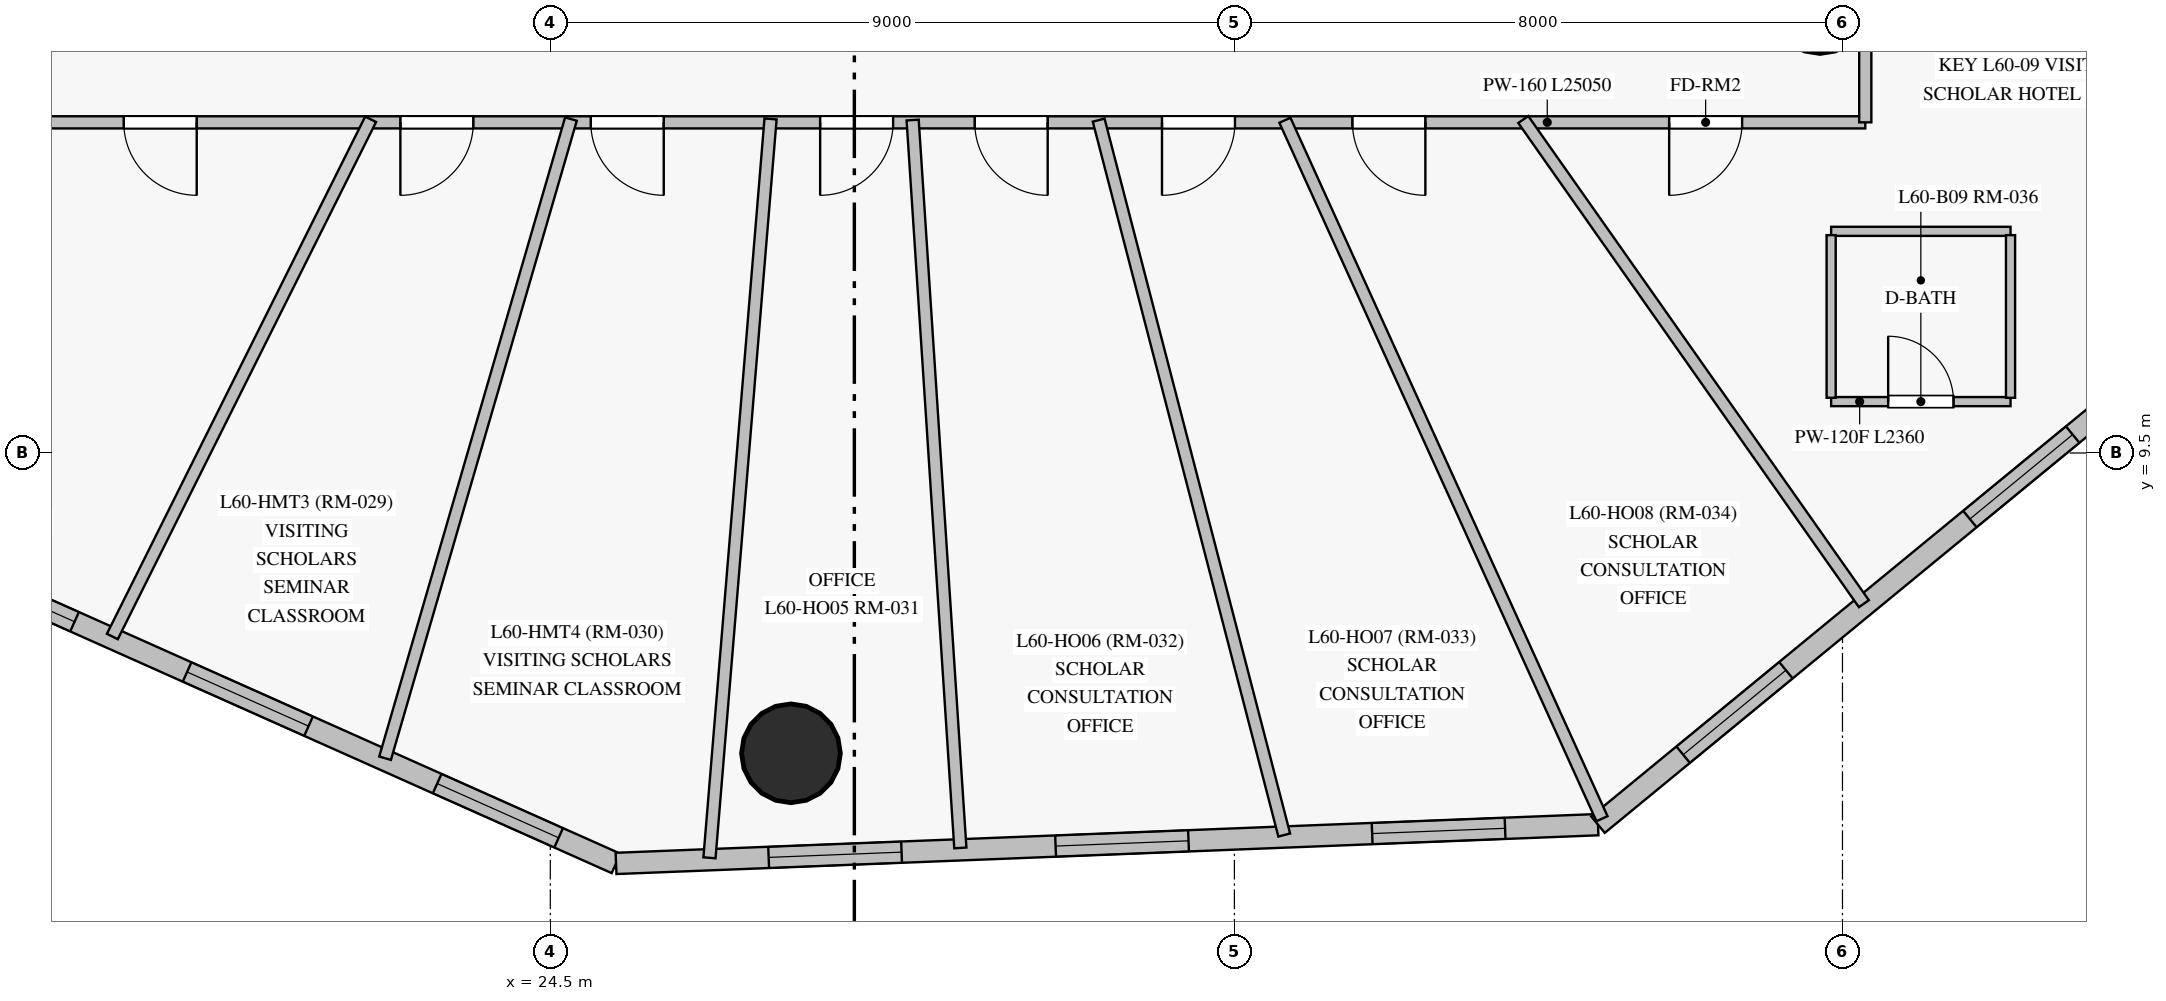
"""IFC4 building model, lengths in metres.
Left out: names, types, materials, properties, quantities, classifications, styles, units other than length and angle.
Written with IfcOpenShell. Run it as: python <this file> out.ifc"""

import sys

from ifc_helpers import new_model, si_unit, direction, frame, frame_2d, origin, origin_with_axes, origin_2d, place, context, subcontext, project, spatial, rectangle, circle, extrude, source, transform, mapped, element, fill, save


model = new_model("IFC4")
c1 = context("Model", 3, precision=1e-05, world=origin(), true_north=direction((0.0, 1.0)))
c2 = subcontext(c1, "Body", "Model", "MODEL_VIEW")
j1 = project(units=[si_unit("LENGTHUNIT", "METRE"), si_unit("PLANEANGLEUNIT", "RADIAN")], contexts=[c1])
p1 = place(None, origin())
s1 = spatial("IfcSite", under=j1, at=p1, CompositionType="ELEMENT")
p2 = place(p1, origin())
s2 = spatial("IfcBuilding", under=s1, at=p2, CompositionType="ELEMENT")
p3 = place(p2, frame((0.0, 0.0, 205.35)))
s3 = spatial("IfcBuildingStorey", under=s2, at=p3, CompositionType="ELEMENT", Elevation=205.35)
m1 = source(origin_with_axes(), c2, "Body", "SweptSolid", [
    extrude(circle(Radius=0.65, at=origin_2d()), origin(), (0.0, 0.0, 1.0), 3.05),
])
for number, where, z_axis, x_axis in (
    (1, (27.666, 5.549, 0.0), (0.0, 0.0, 1.0), (1.0, 0.0, 0.0)),
    (2, (41.204, 15.406, 0.0), (0.0, 0.0, 1.0), (1.0, 0.0, 0.0)),
):
    element("IfcColumn", number, at=place(p3, frame(where, z_axis=z_axis, x_axis=x_axis)), inside=s3, PredefinedType="COLUMN", context=c2, shape_type="MappedRepresentation", body=[
        mapped(m1, transform((0.0, 0.0, 0.0), scale=1.0)),
    ])
p4 = place(p3, frame((16.283, 8.154, 0.0), z_axis=(0.0, 0.0, 1.0), x_axis=(0.913170676177, -0.407577374459, 0.0)))
e3 = element("IfcWall", 3, at=p4, inside=s3, PredefinedType="SOLIDWALL", context=c2, shape_type="SweptSolid", body=[
    extrude(rectangle(XDim=9.946, YDim=0.28, at=frame_2d((4.973, 0.0))), origin(), (0.0, 0.0, 1.0), 2.775),
])
p5 = place(p4, frame((0.594, 0.0, 0.85)))
e4 = element("IfcOpeningElement", 4, at=p5, cuts=e3, PredefinedType="OPENING", context=c2, shape_type="SweptSolid", body=[
    extrude(rectangle(XDim=1.55, YDim=1.65, at=frame_2d((0.775, 0.825))), frame((0.0, 0.15, 0.0), z_axis=(0.0, -1.0, 0.0), x_axis=(1.0, 0.0, 0.0)), (0.0, 0.0, 1.0), 0.3),
])
p6 = place(p4, frame((3.766, 0.0, 0.85)))
e5 = element("IfcOpeningElement", 5, at=p6, cuts=e3, PredefinedType="OPENING", context=c2, shape_type="SweptSolid", body=[
    extrude(rectangle(XDim=1.75, YDim=1.65, at=frame_2d((0.875, 0.825))), frame((0.0, 0.15, 0.0), z_axis=(0.0, -1.0, 0.0), x_axis=(1.0, 0.0, 0.0)), (0.0, 0.0, 1.0), 0.3),
])
p7 = place(p4, frame((7.369, 0.0, 0.85)))
e6 = element("IfcOpeningElement", 6, at=p7, cuts=e3, PredefinedType="OPENING", context=c2, shape_type="SweptSolid", body=[
    extrude(rectangle(XDim=1.75, YDim=1.65, at=frame_2d((0.875, 0.825))), frame((0.0, 0.15, 0.0), z_axis=(0.0, -1.0, 0.0), x_axis=(1.0, 0.0, 0.0)), (0.0, 0.0, 1.0), 0.3),
])
p8 = place(p3, frame((25.365, 4.1, 0.0), z_axis=(0.0, 0.0, 1.0), x_axis=(0.999221637337, 0.039447680249, 0.0)))
e7 = element("IfcWall", 7, at=p8, inside=s3, PredefinedType="SOLIDWALL", context=c2, shape_type="SweptSolid", body=[
    extrude(rectangle(XDim=12.929, YDim=0.28, at=frame_2d((6.464, 0.0))), origin(), (0.0, 0.0, 1.0), 2.775),
])
p9 = place(p8, frame((2.009, 0.0, 0.85)))
e8 = element("IfcOpeningElement", 8, at=p9, cuts=e7, PredefinedType="OPENING", context=c2, shape_type="SweptSolid", body=[
    extrude(rectangle(XDim=1.75, YDim=1.65, at=frame_2d((0.875, 0.825))), frame((0.0, 0.15, 0.0), z_axis=(0.0, -1.0, 0.0), x_axis=(1.0, 0.0, 0.0)), (0.0, 0.0, 1.0), 0.3),
])
p10 = place(p8, frame((5.787, 0.0, 0.85)))
e9 = element("IfcOpeningElement", 9, at=p10, cuts=e7, PredefinedType="OPENING", context=c2, shape_type="SweptSolid", body=[
    extrude(rectangle(XDim=1.75, YDim=1.65, at=frame_2d((0.875, 0.825))), frame((0.0, 0.15, 0.0), z_axis=(0.0, -1.0, 0.0), x_axis=(1.0, 0.0, 0.0)), (0.0, 0.0, 1.0), 0.3),
])
p11 = place(p8, frame((9.955, 0.0, 0.85)))
e10 = element("IfcOpeningElement", 10, at=p11, cuts=e7, PredefinedType="OPENING", context=c2, shape_type="SweptSolid", body=[
    extrude(rectangle(XDim=1.75, YDim=1.65, at=frame_2d((0.875, 0.825))), frame((0.0, 0.15, 0.0), z_axis=(0.0, -1.0, 0.0), x_axis=(1.0, 0.0, 0.0)), (0.0, 0.0, 1.0), 0.3),
])
p12 = place(p3, frame((38.284, 4.61, 0.0), z_axis=(0.0, 0.0, 1.0), x_axis=(0.772578860193, 0.634918817474, 0.0)))
e11 = element("IfcWall", 11, at=p12, inside=s3, PredefinedType="SOLIDWALL", context=c2, shape_type="SweptSolid", body=[
    extrude(rectangle(XDim=9.925, YDim=0.28, at=frame_2d((4.962, 0.0))), origin(), (0.0, 0.0, 1.0), 2.775),
])
p13 = place(p12, frame((1.45, 0.0, 0.85)))
e12 = element("IfcOpeningElement", 12, at=p13, cuts=e11, PredefinedType="OPENING", context=c2, shape_type="SweptSolid", body=[
    extrude(rectangle(XDim=1.75, YDim=1.65, at=frame_2d((0.875, 0.825))), frame((0.0, 0.15, 0.0), z_axis=(0.0, -1.0, 0.0), x_axis=(1.0, 0.0, 0.0)), (0.0, 0.0, 1.0), 0.3),
])
p14 = place(p12, frame((6.333, 0.0, 0.85)))
e13 = element("IfcOpeningElement", 13, at=p14, cuts=e11, PredefinedType="OPENING", context=c2, shape_type="SweptSolid", body=[
    extrude(rectangle(XDim=1.75, YDim=1.65, at=frame_2d((0.875, 0.825))), frame((0.0, 0.15, 0.0), z_axis=(0.0, -1.0, 0.0), x_axis=(1.0, 0.0, 0.0)), (0.0, 0.0, 1.0), 0.3),
])
p15 = place(p3, frame((41.8, 13.85, 0.0), z_axis=(0.0, 0.0, 1.0), x_axis=(-1.0, 0.0, 0.0)))
e14 = element("IfcWall", 14, at=p15, inside=s3, PredefinedType="PARTITIONING", context=c2, shape_type="SweptSolid", body=[
    extrude(rectangle(XDim=25.05, YDim=0.16, at=frame_2d((12.525, 0.0))), origin(), (0.0, 0.0, 1.0), 2.225),
])
p16 = place(p15, frame((1.62, 0.0, 0.0)))
e15 = element("IfcOpeningElement", 15, at=p16, cuts=e14, PredefinedType="OPENING", context=c2, shape_type="SweptSolid", body=[
    extrude(rectangle(XDim=0.96, YDim=2.15, at=frame_2d((0.48, 1.075))), frame((0.0, 0.09, 0.0), z_axis=(0.0, -1.0, 0.0), x_axis=(1.0, 0.0, 0.0)), (0.0, 0.0, 1.0), 0.18),
])
p17 = place(p15, frame((21.952, 0.0, 0.0)))
e16 = element("IfcOpeningElement", 16, at=p17, cuts=e14, PredefinedType="OPENING", context=c2, shape_type="SweptSolid", body=[
    extrude(rectangle(XDim=0.96, YDim=2.15, at=frame_2d((0.48, 1.075))), frame((0.0, 0.09, 0.0), z_axis=(0.0, -1.0, 0.0), x_axis=(1.0, 0.0, 0.0)), (0.0, 0.0, 1.0), 0.18),
])
p18 = place(p15, frame((18.312, 0.0, 0.0)))
e17 = element("IfcOpeningElement", 17, at=p18, cuts=e14, PredefinedType="OPENING", context=c2, shape_type="SweptSolid", body=[
    extrude(rectangle(XDim=0.96, YDim=2.15, at=frame_2d((0.48, 1.075))), frame((0.0, 0.09, 0.0), z_axis=(0.0, -1.0, 0.0), x_axis=(1.0, 0.0, 0.0)), (0.0, 0.0, 1.0), 0.18),
])
p19 = place(p15, frame((15.808, 0.0, 0.0)))
e18 = element("IfcOpeningElement", 18, at=p19, cuts=e14, PredefinedType="OPENING", context=c2, shape_type="SweptSolid", body=[
    extrude(rectangle(XDim=0.96, YDim=2.15, at=frame_2d((0.48, 1.075))), frame((0.0, 0.09, 0.0), z_axis=(0.0, -1.0, 0.0), x_axis=(1.0, 0.0, 0.0)), (0.0, 0.0, 1.0), 0.18),
])
p20 = place(p15, frame((12.79, 0.0, 0.0)))
e19 = element("IfcOpeningElement", 19, at=p20, cuts=e14, PredefinedType="OPENING", context=c2, shape_type="SweptSolid", body=[
    extrude(rectangle(XDim=0.96, YDim=2.15, at=frame_2d((0.48, 1.075))), frame((0.0, 0.09, 0.0), z_axis=(0.0, -1.0, 0.0), x_axis=(1.0, 0.0, 0.0)), (0.0, 0.0, 1.0), 0.18),
])
p21 = place(p15, frame((10.756, 0.0, 0.0)))
e20 = element("IfcOpeningElement", 20, at=p21, cuts=e14, PredefinedType="OPENING", context=c2, shape_type="SweptSolid", body=[
    extrude(rectangle(XDim=0.96, YDim=2.15, at=frame_2d((0.48, 1.075))), frame((0.0, 0.09, 0.0), z_axis=(0.0, -1.0, 0.0), x_axis=(1.0, 0.0, 0.0)), (0.0, 0.0, 1.0), 0.18),
])
p22 = place(p15, frame((8.292, 0.0, 0.0)))
e21 = element("IfcOpeningElement", 21, at=p22, cuts=e14, PredefinedType="OPENING", context=c2, shape_type="SweptSolid", body=[
    extrude(rectangle(XDim=0.96, YDim=2.15, at=frame_2d((0.48, 1.075))), frame((0.0, 0.09, 0.0), z_axis=(0.0, -1.0, 0.0), x_axis=(1.0, 0.0, 0.0)), (0.0, 0.0, 1.0), 0.18),
])
p23 = place(p15, frame((5.788, 0.0, 0.0)))
e22 = element("IfcOpeningElement", 22, at=p23, cuts=e14, PredefinedType="OPENING", context=c2, shape_type="SweptSolid", body=[
    extrude(rectangle(XDim=0.96, YDim=2.15, at=frame_2d((0.48, 1.075))), frame((0.0, 0.09, 0.0), z_axis=(0.0, -1.0, 0.0), x_axis=(1.0, 0.0, 0.0)), (0.0, 0.0, 1.0), 0.18),
])
p24 = place(p3, frame((41.8, 33.45, 0.0), z_axis=(0.0, 0.0, 1.0), x_axis=(0.0, -1.0, 0.0)))
e23 = element("IfcWall", 23, at=p24, inside=s3, PredefinedType="PARTITIONING", context=c2, shape_type="SweptSolid", body=[
    extrude(rectangle(XDim=19.6, YDim=0.16, at=frame_2d((9.8, 0.0))), origin(), (0.0, 0.0, 1.0), 2.225),
])
p25 = place(p24, frame((9.325, 0.0, 0.0)))
e24 = element("IfcOpeningElement", 24, at=p25, cuts=e23, PredefinedType="OPENING", context=c2, shape_type="SweptSolid", body=[
    extrude(rectangle(XDim=0.96, YDim=2.15, at=frame_2d((0.48, 1.075))), frame((0.0, 0.09, 0.0), z_axis=(0.0, -1.0, 0.0), x_axis=(1.0, 0.0, 0.0)), (0.0, 0.0, 1.0), 0.18),
])
p26 = place(p24, frame((4.425, 0.0, 0.0)))
e25 = element("IfcOpeningElement", 25, at=p26, cuts=e23, PredefinedType="OPENING", context=c2, shape_type="SweptSolid", body=[
    extrude(rectangle(XDim=0.96, YDim=2.15, at=frame_2d((0.48, 1.075))), frame((0.0, 0.09, 0.0), z_axis=(0.0, -1.0, 0.0), x_axis=(1.0, 0.0, 0.0)), (0.0, 0.0, 1.0), 0.18),
])
p27 = place(p3, frame((34.165, 13.877, 0.0), z_axis=(0.0, 0.0, 1.0), x_axis=(0.413396417062, -0.910551153072, 0.0)))
e26 = element("IfcWall", 26, at=p27, inside=s3, PredefinedType="PARTITIONING", context=c2, shape_type="SweptSolid", body=[
    extrude(rectangle(XDim=10.091, YDim=0.16, at=frame_2d((5.045, 0.0))), origin(), (0.0, 0.0, 1.0), 2.775),
])
p28 = place(p3, frame((27.398, 13.895, 0.0), z_axis=(0.0, 0.0, 1.0), x_axis=(-0.082401222831, -0.996599236642, 0.0)))
e27 = element("IfcWall", 27, at=p28, inside=s3, PredefinedType="PARTITIONING", context=c2, shape_type="SweptSolid", body=[
    extrude(rectangle(XDim=9.754, YDim=0.16, at=frame_2d((4.877, 0.0))), origin(), (0.0, 0.0, 1.0), 2.225),
])
p29 = place(p3, frame((31.714, 13.879, 0.0), z_axis=(0.0, 0.0, 1.0), x_axis=(0.251257746331, -0.96792021619, 0.0)))
e28 = element("IfcWall", 28, at=p29, inside=s3, PredefinedType="PARTITIONING", context=c2, shape_type="SweptSolid", body=[
    extrude(rectangle(XDim=9.717, YDim=0.16, at=frame_2d((4.858, 0.0))), origin(), (0.0, 0.0, 1.0), 2.775),
])
p30 = place(p3, frame((29.267, 13.88, 0.0), z_axis=(0.0, 0.0, 1.0), x_axis=(0.065384238802, -0.997860161203, 0.0)))
e29 = element("IfcWall", 29, at=p30, inside=s3, PredefinedType="PARTITIONING", context=c2, shape_type="SweptSolid", body=[
    extrude(rectangle(XDim=9.596, YDim=0.16, at=frame_2d((4.798, 0.0))), origin(), (0.0, 0.0, 1.0), 2.775),
])
p31 = place(p3, frame((24.771, 13.893, 0.0), z_axis=(0.0, 0.0, 1.0), x_axis=(-0.2792141032, -0.960228870934, 0.0)))
e30 = element("IfcWall", 30, at=p31, inside=s3, PredefinedType="PARTITIONING", context=c2, shape_type="SweptSolid", body=[
    extrude(rectangle(XDim=8.757, YDim=0.16, at=frame_2d((4.378, 0.0))), origin(), (0.0, 0.0, 1.0), 2.775),
])
p32 = place(p3, frame((37.301, 13.887, 0.0), z_axis=(0.0, 0.0, 1.0), x_axis=(0.575425843923, -0.817853958935, 0.0)))
e31 = element("IfcWall", 31, at=p32, inside=s3, PredefinedType="PARTITIONING", context=c2, shape_type="SweptSolid", body=[
    extrude(rectangle(XDim=7.788, YDim=0.16, at=frame_2d((3.894, 0.0))), origin(), (0.0, 0.0, 1.0), 2.775),
])
p33 = place(p3, frame((22.136, 13.89, 0.0), z_axis=(0.0, 0.0, 1.0), x_axis=(-0.446751312841, -0.894658183037, 0.0)))
e32 = element("IfcWall", 32, at=p33, inside=s3, PredefinedType="PARTITIONING", context=c2, shape_type="SweptSolid", body=[
    extrude(rectangle(XDim=7.606, YDim=0.16, at=frame_2d((3.803, 0.0))), origin(), (0.0, 0.0, 1.0), 2.775),
])
p34 = place(p3, frame((41.351, 10.176, 0.0), z_axis=(0.0, 0.0, 1.0), x_axis=(1.0, 0.0, 0.0)))
e33 = element("IfcWall", 33, at=p34, inside=s3, PredefinedType="PARTITIONING", context=c2, shape_type="SweptSolid", body=[
    extrude(rectangle(XDim=2.36, YDim=0.12, at=frame_2d((1.18, 0.0))), origin(), (0.0, 0.0, 1.0), 2.775),
])
p35 = place(p34, frame((0.75, 0.0, 0.0)))
e34 = element("IfcOpeningElement", 34, at=p35, cuts=e33, PredefinedType="OPENING", context=c2, shape_type="SweptSolid", body=[
    extrude(rectangle(XDim=0.86, YDim=2.1, at=frame_2d((0.43, 1.05))), frame((0.0, 0.07, 0.0), z_axis=(0.0, -1.0, 0.0), x_axis=(1.0, 0.0, 0.0)), (0.0, 0.0, 1.0), 0.14),
])
p36 = place(p3, frame((43.711, 12.416, 0.0), z_axis=(0.0, 0.0, 1.0), x_axis=(-1.0, 0.0, 0.0)))
e35 = element("IfcWall", 35, at=p36, inside=s3, PredefinedType="PARTITIONING", context=c2, shape_type="SweptSolid", body=[
    extrude(rectangle(XDim=2.36, YDim=0.12, at=frame_2d((1.18, 0.0))), origin(), (0.0, 0.0, 1.0), 2.775),
])
for number, where, z_axis, x_axis in (
    (36, (43.711, 10.226, 0.0), (0.0, 0.0, 1.0), (0.0, 1.0, 0.0)),
    (37, (41.351, 12.366, 0.0), (0.0, 0.0, 1.0), (0.0, -1.0, 0.0)),
):
    element("IfcWall", number, at=place(p3, frame(where, z_axis=z_axis, x_axis=x_axis)), inside=s3, PredefinedType="PARTITIONING", context=c2, shape_type="SweptSolid", body=[
        extrude(rectangle(XDim=2.14, YDim=0.12, at=frame_2d((1.07, 0.0))), origin(), (0.0, 0.0, 1.0), 2.775),
    ])
m2 = source(origin_with_axes(), c2, "Body", "SweptSolid", [
    extrude(rectangle(XDim=1.55, YDim=1.65, at=frame_2d((0.775, 0.825))), frame((0.0, 0.03, 0.0), z_axis=(0.0, -1.0, 0.0), x_axis=(1.0, 0.0, 0.0)), (0.0, 0.0, 1.0), 0.06),
])
p37 = place(p5, origin())
e38 = element("IfcWindow", 38, at=p37, inside=s3, PartitioningType="SINGLE_PANEL", PredefinedType="WINDOW", context=c2, shape_type="MappedRepresentation", body=[
    mapped(m2, transform((0.0, 0.0, 0.0), scale=1.0)),
])
fill(e4, e38)
m3 = source(origin_with_axes(), c2, "Body", "SweptSolid", [
    extrude(rectangle(XDim=1.75, YDim=1.65, at=frame_2d((0.875, 0.825))), frame((0.0, 0.03, 0.0), z_axis=(0.0, -1.0, 0.0), x_axis=(1.0, 0.0, 0.0)), (0.0, 0.0, 1.0), 0.06),
])
p38 = place(p6, origin())
e39 = element("IfcWindow", 39, at=p38, inside=s3, PartitioningType="SINGLE_PANEL", PredefinedType="WINDOW", context=c2, shape_type="MappedRepresentation", body=[
    mapped(m3, transform((0.0, 0.0, 0.0), scale=1.0)),
])
fill(e5, e39)
p39 = place(p7, origin())
e40 = element("IfcWindow", 40, at=p39, inside=s3, PartitioningType="SINGLE_PANEL", PredefinedType="WINDOW", context=c2, shape_type="MappedRepresentation", body=[
    mapped(m3, transform((0.0, 0.0, 0.0), scale=1.0)),
])
fill(e6, e40)
p40 = place(p9, origin())
e41 = element("IfcWindow", 41, at=p40, inside=s3, PartitioningType="SINGLE_PANEL", PredefinedType="WINDOW", context=c2, shape_type="MappedRepresentation", body=[
    mapped(m3, transform((0.0, 0.0, 0.0), scale=1.0)),
])
fill(e8, e41)
p41 = place(p10, origin())
e42 = element("IfcWindow", 42, at=p41, inside=s3, PartitioningType="SINGLE_PANEL", PredefinedType="WINDOW", context=c2, shape_type="MappedRepresentation", body=[
    mapped(m3, transform((0.0, 0.0, 0.0), scale=1.0)),
])
fill(e9, e42)
p42 = place(p11, origin())
e43 = element("IfcWindow", 43, at=p42, inside=s3, PartitioningType="SINGLE_PANEL", PredefinedType="WINDOW", context=c2, shape_type="MappedRepresentation", body=[
    mapped(m3, transform((0.0, 0.0, 0.0), scale=1.0)),
])
fill(e10, e43)
p43 = place(p13, origin())
e44 = element("IfcWindow", 44, at=p43, inside=s3, PartitioningType="SINGLE_PANEL", PredefinedType="WINDOW", context=c2, shape_type="MappedRepresentation", body=[
    mapped(m3, transform((0.0, 0.0, 0.0), scale=1.0)),
])
fill(e12, e44)
p44 = place(p14, origin())
e45 = element("IfcWindow", 45, at=p44, inside=s3, PartitioningType="SINGLE_PANEL", PredefinedType="WINDOW", context=c2, shape_type="MappedRepresentation", body=[
    mapped(m3, transform((0.0, 0.0, 0.0), scale=1.0)),
])
fill(e13, e45)
m4 = source(origin_with_axes(), c2, "Body", "SweptSolid", [
    extrude(rectangle(XDim=0.86, YDim=2.1, at=frame_2d((0.43, 1.05))), frame((0.0, 0.025, 0.0), z_axis=(0.0, -1.0, 0.0), x_axis=(1.0, 0.0, 0.0)), (0.0, 0.0, 1.0), 0.05),
])
p45 = place(p35, origin())
e46 = element("IfcDoor", 46, at=p45, inside=s3, OperationType="SINGLE_SWING_LEFT", PredefinedType="DOOR", context=c2, shape_type="MappedRepresentation", body=[
    mapped(m4, transform((0.0, 0.0, 0.0), scale=1.0)),
])
fill(e34, e46)
m5 = source(origin_with_axes(), c2, "Body", "SweptSolid", [
    extrude(rectangle(XDim=0.96, YDim=2.15, at=frame_2d((0.48, 1.075))), frame((0.0, 0.025, 0.0), z_axis=(0.0, -1.0, 0.0), x_axis=(1.0, 0.0, 0.0)), (0.0, 0.0, 1.0), 0.05),
])
p46 = place(p16, origin())
e47 = element("IfcDoor", 47, at=p46, inside=s3, OperationType="SINGLE_SWING_RIGHT", PredefinedType="DOOR", context=c2, shape_type="MappedRepresentation", body=[
    mapped(m5, transform((0.0, 0.0, 0.0), scale=1.0)),
])
fill(e15, e47)
p47 = place(p17, origin())
e48 = element("IfcDoor", 48, at=p47, inside=s3, OperationType="SINGLE_SWING_LEFT", PredefinedType="DOOR", context=c2, shape_type="MappedRepresentation", body=[
    mapped(m5, transform((0.0, 0.0, 0.0), scale=1.0)),
])
fill(e16, e48)
p48 = place(p18, origin())
e49 = element("IfcDoor", 49, at=p48, inside=s3, OperationType="SINGLE_SWING_RIGHT", PredefinedType="DOOR", context=c2, shape_type="MappedRepresentation", body=[
    mapped(m5, transform((0.0, 0.0, 0.0), scale=1.0)),
])
fill(e17, e49)
p49 = place(p19, origin())
e50 = element("IfcDoor", 50, at=p49, inside=s3, OperationType="SINGLE_SWING_LEFT", PredefinedType="DOOR", context=c2, shape_type="MappedRepresentation", body=[
    mapped(m5, transform((0.0, 0.0, 0.0), scale=1.0)),
])
fill(e18, e50)
p50 = place(p20, origin())
e51 = element("IfcDoor", 51, at=p50, inside=s3, OperationType="SINGLE_SWING_RIGHT", PredefinedType="DOOR", context=c2, shape_type="MappedRepresentation", body=[
    mapped(m5, transform((0.0, 0.0, 0.0), scale=1.0)),
])
fill(e19, e51)
p51 = place(p21, origin())
e52 = element("IfcDoor", 52, at=p51, inside=s3, OperationType="SINGLE_SWING_LEFT", PredefinedType="DOOR", context=c2, shape_type="MappedRepresentation", body=[
    mapped(m5, transform((0.0, 0.0, 0.0), scale=1.0)),
])
fill(e20, e52)
p52 = place(p22, origin())
e53 = element("IfcDoor", 53, at=p52, inside=s3, OperationType="SINGLE_SWING_RIGHT", PredefinedType="DOOR", context=c2, shape_type="MappedRepresentation", body=[
    mapped(m5, transform((0.0, 0.0, 0.0), scale=1.0)),
])
fill(e21, e53)
p53 = place(p23, origin())
e54 = element("IfcDoor", 54, at=p53, inside=s3, OperationType="SINGLE_SWING_LEFT", PredefinedType="DOOR", context=c2, shape_type="MappedRepresentation", body=[
    mapped(m5, transform((0.0, 0.0, 0.0), scale=1.0)),
])
fill(e22, e54)
save(model, sys.argv[1])
